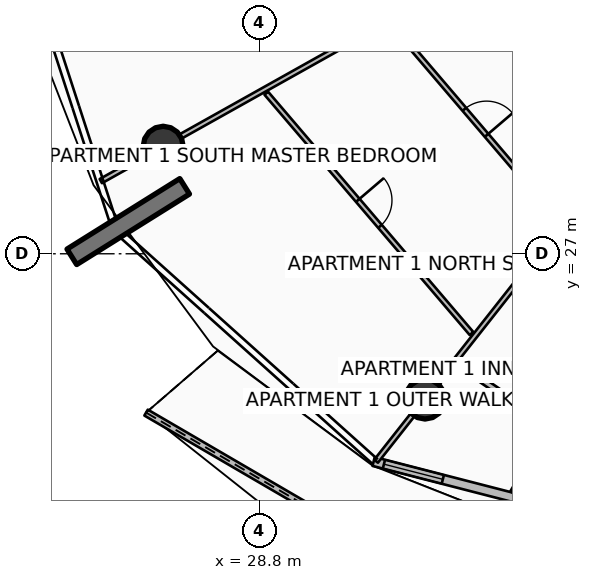
"""IFC4 building model, lengths in metres.
Left out: names, types, materials, properties, quantities, classifications, styles, units other than length and angle.
Written with IfcOpenShell. Run it as: python <this file> out.ifc"""

import sys

from ifc_helpers import new_model, si_unit, direction, frame, frame_2d, origin, origin_2d, place, context, subcontext, project, spatial, polyline, rectangle, circle, outline, extrude, element, fill, save


model = new_model("IFC4")
c1 = context("Model", 3, precision=1e-05, world=origin(), true_north=direction((0.0, 1.0)))
c2 = subcontext(c1, "Body", "Model", "MODEL_VIEW")
j1 = project(units=[si_unit("LENGTHUNIT", "METRE"), si_unit("PLANEANGLEUNIT", "RADIAN")], contexts=[c1])
p1 = place(None, origin())
s1 = spatial("IfcSite", under=j1, at=p1, CompositionType="ELEMENT")
p2 = place(p1, origin())
s2 = spatial("IfcBuilding", under=s1, at=p2, CompositionType="ELEMENT")
p3 = place(p2, frame((0.0, 0.0, 150.3)))
s3 = spatial("IfcBuildingStorey", under=s2, at=p3, CompositionType="ELEMENT", Elevation=150.3)
p4 = place(p3, frame((26.835, 28.774, 0.0), z_axis=(0.0, 0.0, 1.0), x_axis=(-0.848053161125, -0.529911158502, 0.0)))
e1 = element("IfcWall", 1, at=p4, inside=s3, PredefinedType="SOLIDWALL", context=c2, shape_type="SweptSolid", body=[
    extrude(rectangle(XDim=3.5, YDim=0.48, at=frame_2d((1.75, 0.0))), origin(), (0.0, 0.0, 1.0), 3.75),
])
for number, where, z_axis, x_axis in (
    (2, (26.27, 29.831, 0.0), (0.0, 0.0, 1.0), (1.0, 0.0, 0.0)),
    (3, (33.16, 23.176, 0.0), (0.0, 0.0, 1.0), (1.0, 0.0, 0.0)),
):
    element("IfcColumn", number, at=place(p3, frame(where, z_axis=z_axis, x_axis=x_axis)), inside=s3, PredefinedType="COLUMN", context=c2, shape_type="SweptSolid", body=[
        extrude(circle(Radius=0.525, at=origin_2d()), origin(), (0.0, 0.0, 1.0), 3.5),
    ])
p5 = place(p3, frame((25.82, 22.821, 0.0), z_axis=(0.0, 0.0, 1.0), x_axis=(0.863978518166, -0.503528668645, 0.0)))
e4 = element("IfcWall", 4, at=p5, inside=s3, PredefinedType="PARAPET", context=c2, shape_type="SweptSolid", body=[
    extrude(outline(polyline([(0.0, 0.0), (10.953, 0.0), (10.953, 1.832), (5.477, 1.853), (0.0, 1.756), (0.0, 0.0)])), frame((0.0, 0.09, 0.0), z_axis=(0.0, -1.0, 0.0), x_axis=(1.0, 0.0, 0.0)), (0.0, 0.0, 1.0), 0.18),
])
p6 = place(p3, frame((31.808, 21.534, 0.0), z_axis=(0.0, 0.0, 1.0), x_axis=(0.968379685126, -0.249481032214, 0.0)))
e5 = element("IfcWall", 5, at=p6, inside=s3, PredefinedType="SOLIDWALL", context=c2, shape_type="SweptSolid", body=[
    extrude(rectangle(XDim=10.082, YDim=0.24, at=frame_2d((5.041, 0.0))), origin(), (0.0, 0.0, 1.0), 2.45),
])
p7 = place(p6, frame((7.862, 0.0, 0.0)))
e6 = element("IfcOpeningElement", 6, at=p7, cuts=e5, PredefinedType="OPENING", context=c2, shape_type="SweptSolid", body=[
    extrude(rectangle(XDim=1.45, YDim=2.15, at=frame_2d((0.725, 1.075))), frame((0.0, 0.13, 0.0), z_axis=(0.0, -1.0, 0.0), x_axis=(1.0, 0.0, 0.0)), (0.0, 0.0, 1.0), 0.26),
])
p8 = place(p6, frame((0.28, 0.0, 0.65)))
e7 = element("IfcOpeningElement", 7, at=p8, cuts=e5, PredefinedType="OPENING", context=c2, shape_type="SweptSolid", body=[
    extrude(rectangle(XDim=1.6, YDim=1.5, at=frame_2d((0.8, 0.75))), frame((0.0, 0.13, 0.0), z_axis=(0.0, -1.0, 0.0), x_axis=(1.0, 0.0, 0.0)), (0.0, 0.0, 1.0), 0.26),
])
p9 = place(p3, frame((32.104, 33.098, 0.0), z_axis=(0.0, 0.0, 1.0), x_axis=(-0.872488035617, -0.488635475283, 0.0)))
e8 = element("IfcWall", 8, at=p9, inside=s3, PredefinedType="PARTITIONING", context=c2, shape_type="SweptSolid", body=[
    extrude(rectangle(XDim=8.567, YDim=0.125, at=frame_2d((4.284, 0.0))), origin(), (0.0, 0.0, 1.0), 2.94),
])
p10 = place(p3, frame((32.263, 33.063, 0.0), z_axis=(0.0, 0.0, 1.0), x_axis=(0.649448927448, -0.760405214762, 0.0)))
e9 = element("IfcWall", 9, at=p10, inside=s3, PredefinedType="PARTITIONING", context=c2, shape_type="SweptSolid", body=[
    extrude(rectangle(XDim=6.85, YDim=0.125, at=frame_2d((3.425, 0.0))), origin(), (0.0, 0.0, 1.0), 2.94),
])
p11 = place(p10, frame((2.975, 0.0, 0.0)))
e10 = element("IfcOpeningElement", 10, at=p11, cuts=e9, PredefinedType="OPENING", context=c2, shape_type="SweptSolid", body=[
    extrude(rectangle(XDim=0.9, YDim=2.08, at=frame_2d((0.45, 1.04))), frame((0.0, 0.073, 0.0), z_axis=(0.0, -1.0, 0.0), x_axis=(1.0, 0.0, 0.0)), (0.0, 0.0, 1.0), 0.145),
])
p12 = place(p3, frame((28.982, 31.226, 0.0), z_axis=(0.0, 0.0, 1.0), x_axis=(0.649429273824, -0.760422000142, 0.0)))
e11 = element("IfcWall", 11, at=p12, inside=s3, PredefinedType="PARTITIONING", context=c2, shape_type="SweptSolid", body=[
    extrude(rectangle(XDim=8.317, YDim=0.125, at=frame_2d((4.158, 0.0))), origin(), (0.0, 0.0, 1.0), 2.94),
])
p13 = place(p12, frame((3.708, 0.0, 0.0)))
e12 = element("IfcOpeningElement", 12, at=p13, cuts=e11, PredefinedType="OPENING", context=c2, shape_type="SweptSolid", body=[
    extrude(rectangle(XDim=0.9, YDim=2.08, at=frame_2d((0.45, 1.04))), frame((0.0, 0.073, 0.0), z_axis=(0.0, -1.0, 0.0), x_axis=(1.0, 0.0, 0.0)), (0.0, 0.0, 1.0), 0.145),
])
p14 = place(p3, frame((36.721, 27.692, 0.0), z_axis=(0.0, 0.0, 1.0), x_axis=(-0.619091325953, -0.785318998962, 0.0)))
e13 = element("IfcWall", 13, at=p14, inside=s3, PredefinedType="PARTITIONING", context=c2, shape_type="SweptSolid", body=[
    extrude(rectangle(XDim=7.833, YDim=0.125, at=frame_2d((3.917, 0.0))), origin(), (0.0, 0.0, 1.0), 2.94),
])
p15 = place(p3, frame((34.023, 24.11, 0.0), z_axis=(0.0, 0.0, 1.0), x_axis=(0.825328087742, -0.564653475667, 0.0)))
e14 = element("IfcWall", 14, at=p15, inside=s3, PredefinedType="PARTITIONING", context=c2, shape_type="SweptSolid", body=[
    extrude(rectangle(XDim=2.875, YDim=0.15, at=frame_2d((1.438, 0.0))), origin(), (0.0, 0.0, 1.0), 2.94),
])
p16 = place(p3, frame((36.425, 22.358, 0.0), z_axis=(0.0, 0.0, 1.0), x_axis=(-0.507653216709, -0.861561496102, 0.0)))
e15 = element("IfcWall", 15, at=p16, inside=s3, PredefinedType="PARTITIONING", context=c2, shape_type="SweptSolid", body=[
    extrude(rectangle(XDim=1.904, YDim=0.125, at=frame_2d((0.952, 0.0))), origin(), (0.0, 0.0, 1.0), 2.94),
])
p17 = place(p16, frame((0.527, 0.0, 0.0)))
e16 = element("IfcOpeningElement", 16, at=p17, cuts=e15, PredefinedType="OPENING", context=c2, shape_type="SweptSolid", body=[
    extrude(rectangle(XDim=0.85, YDim=2.06, at=frame_2d((0.425, 1.03))), frame((0.0, 0.073, 0.0), z_axis=(0.0, -1.0, 0.0), x_axis=(1.0, 0.0, 0.0)), (0.0, 0.0, 1.0), 0.145),
])
p18 = place(p8, origin())
e17 = element("IfcWindow", 17, at=p18, inside=s3, PartitioningType="SINGLE_PANEL", PredefinedType="WINDOW", context=c2, shape_type="SweptSolid", body=[
    extrude(rectangle(XDim=1.6, YDim=1.5, at=frame_2d((0.8, 0.75))), frame((0.0, 0.03, 0.0), z_axis=(0.0, -1.0, 0.0), x_axis=(1.0, 0.0, 0.0)), (0.0, 0.0, 1.0), 0.06),
])
fill(e7, e17)
p19 = place(p11, origin())
e18 = element("IfcDoor", 18, at=p19, inside=s3, OperationType="SINGLE_SWING_RIGHT", PredefinedType="DOOR", context=c2, shape_type="SweptSolid", body=[
    extrude(rectangle(XDim=0.9, YDim=2.08, at=frame_2d((0.45, 1.04))), frame((0.0, 0.025, 0.0), z_axis=(0.0, -1.0, 0.0), x_axis=(1.0, 0.0, 0.0)), (0.0, 0.0, 1.0), 0.05),
])
fill(e10, e18)
p20 = place(p13, origin())
e19 = element("IfcDoor", 19, at=p20, inside=s3, OperationType="SINGLE_SWING_LEFT", PredefinedType="DOOR", context=c2, shape_type="SweptSolid", body=[
    extrude(rectangle(XDim=0.9, YDim=2.08, at=frame_2d((0.45, 1.04))), frame((0.0, 0.025, 0.0), z_axis=(0.0, -1.0, 0.0), x_axis=(1.0, 0.0, 0.0)), (0.0, 0.0, 1.0), 0.05),
])
fill(e12, e19)
save(model, sys.argv[1])
